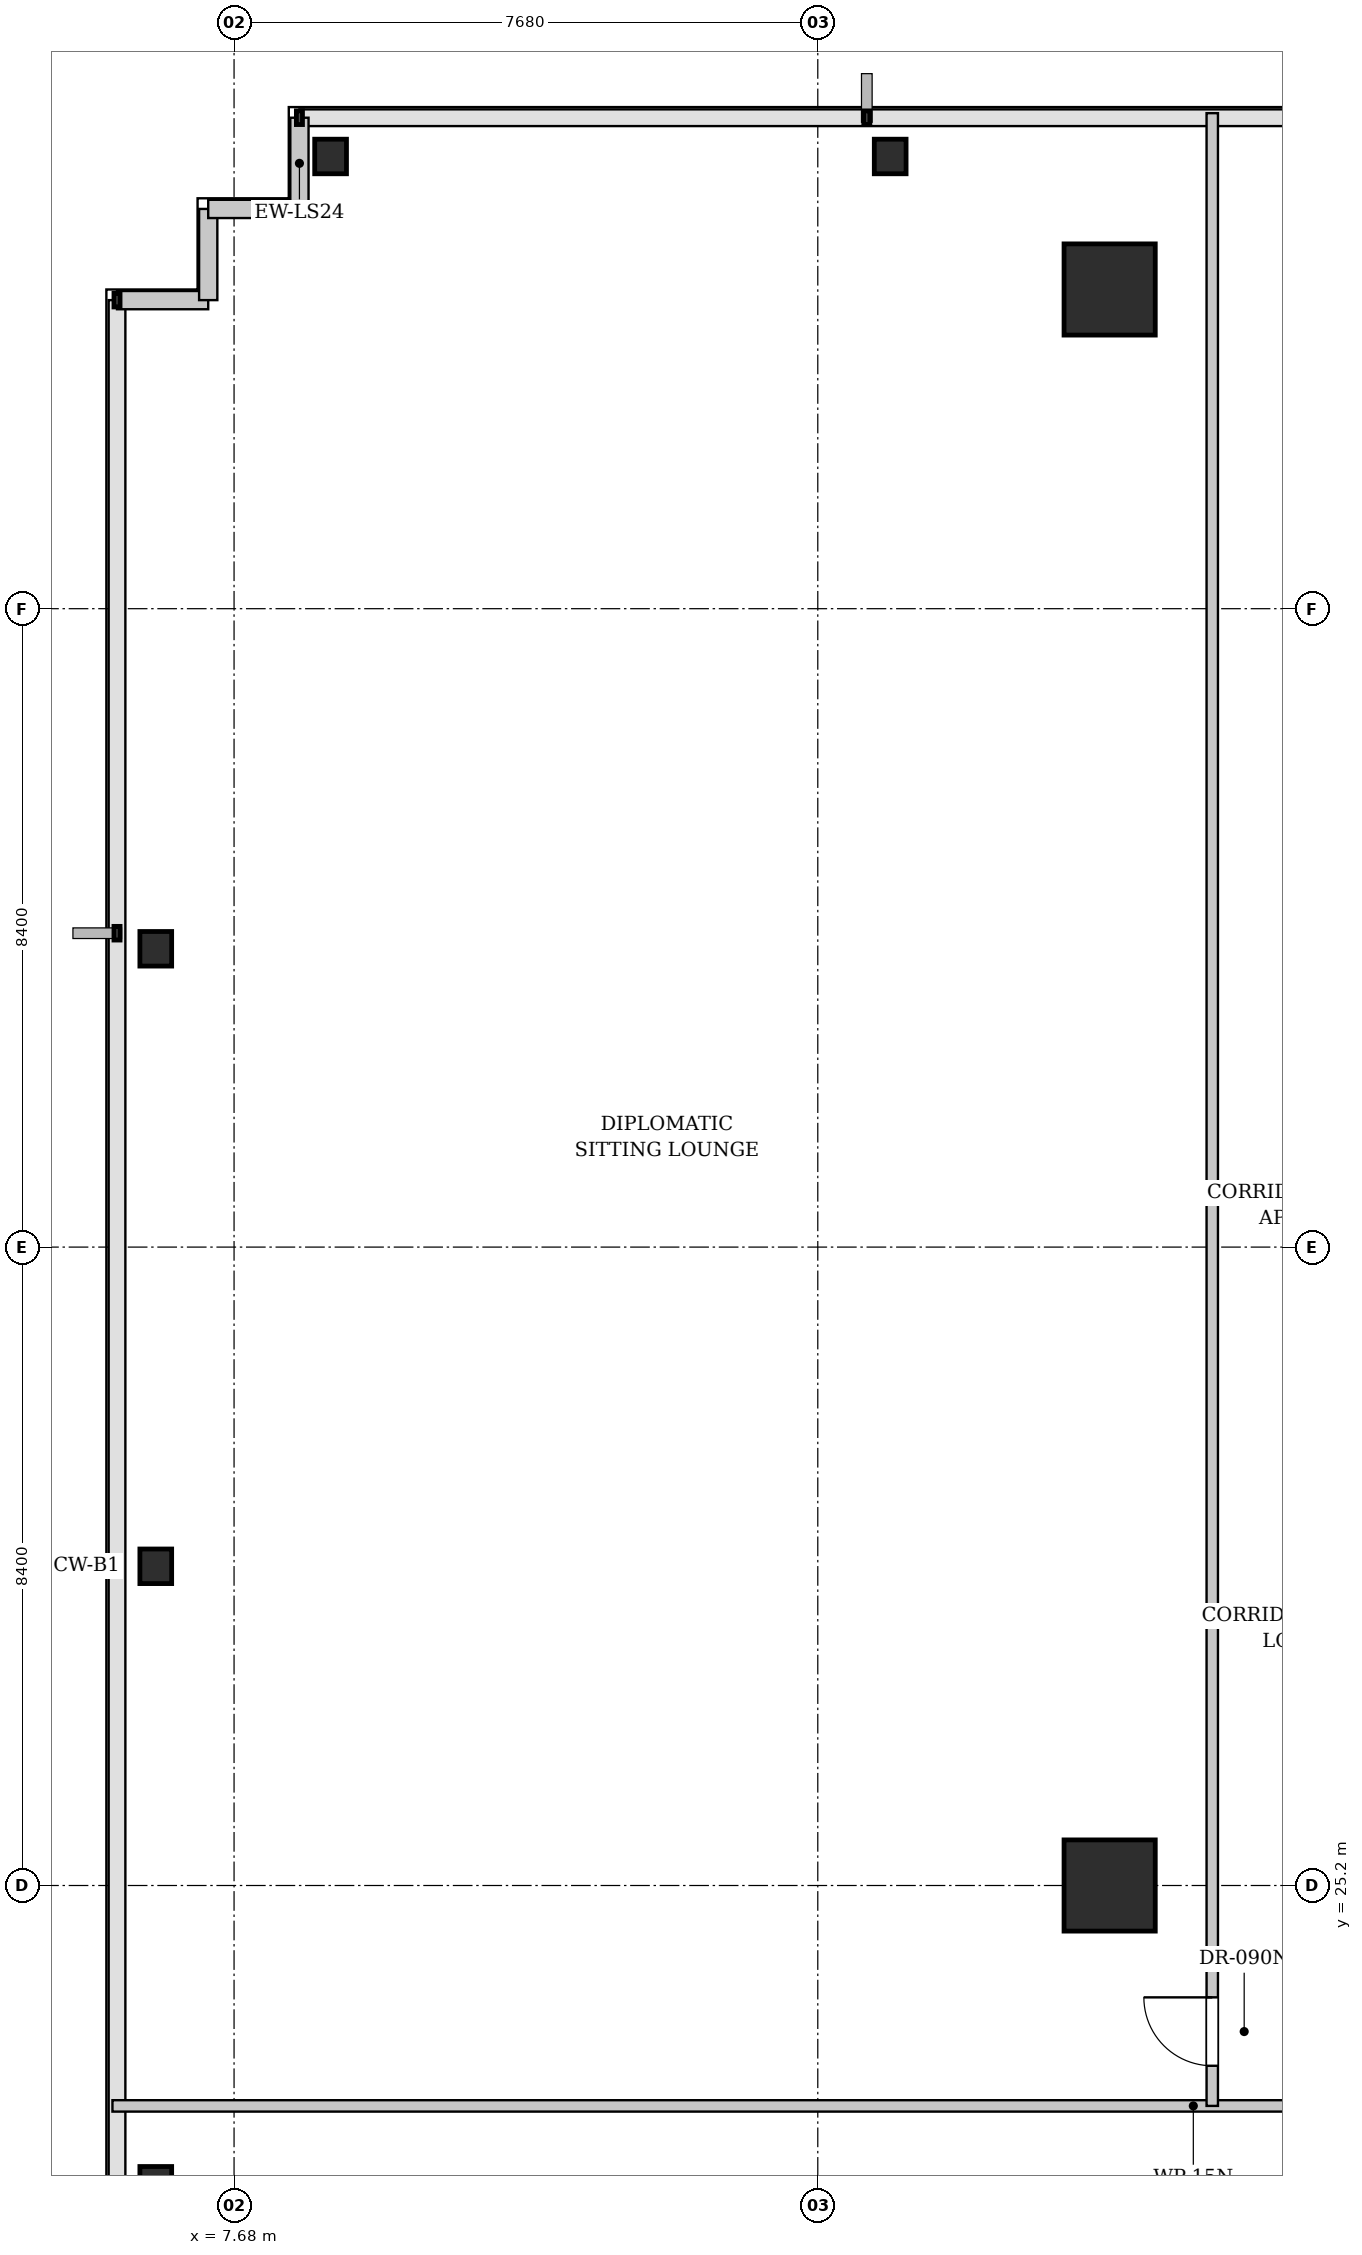
"""IFC4 building model, lengths in metres.
Left out: names, types, materials, properties, quantities, classifications, styles, units other than length and angle.
Written with IfcOpenShell. Run it as: python <this file> out.ifc"""

import sys

from ifc_helpers import new_model, si_unit, direction, frame, frame_2d, origin, origin_2d, place, context, subcontext, project, spatial, rectangle, i_section, extrude, element, fill, save


model = new_model("IFC4")
c1 = context("Model", 3, precision=1e-05, world=origin(), true_north=direction((0.0, 1.0)))
c2 = subcontext(c1, "Body", "Model", "MODEL_VIEW")
j1 = project(units=[si_unit("LENGTHUNIT", "METRE"), si_unit("PLANEANGLEUNIT", "RADIAN")], contexts=[c1])
p1 = place(None, origin())
s1 = spatial("IfcSite", under=j1, at=p1, CompositionType="ELEMENT")
p2 = place(p1, origin())
s2 = spatial("IfcBuilding", under=s1, at=p2, CompositionType="ELEMENT")
p3 = place(p2, frame((0.0, 0.0, 47.4)))
s3 = spatial("IfcBuildingStorey", under=s2, at=p3, CompositionType="ELEMENT", Elevation=47.4)
for number, where, z_axis, x_axis in (
    (1, (19.2, 25.2, 0.0), (0.0, 0.0, 1.0), (1.0, 0.0, 0.0)),
    (2, (19.2, 46.2, 0.0), (0.0, 0.0, 1.0), (1.0, 0.0, 0.0)),
):
    element("IfcColumn", number, at=place(p3, frame(where, z_axis=z_axis, x_axis=x_axis)), inside=s3, PredefinedType="COLUMN", context=c2, shape_type="SweptSolid", body=[
        extrude(rectangle(XDim=1.2, YDim=1.2, at=origin_2d()), origin(), (0.0, 0.0, 1.0), 3.4),
    ])
for number, where, z_axis, x_axis in (
    (3, (8.95, 47.95, 0.0), (0.0, 0.0, 1.0), (1.0, 0.0, 0.0)),
    (4, (16.312, 47.95, 0.0), (0.0, 0.0, 1.0), (1.0, 0.0, 0.0)),
    (5, (6.65, 21.275, 0.0), (0.0, 0.0, 1.0), (1.0, 0.0, 0.0)),
    (6, (6.65, 29.4, 0.0), (0.0, 0.0, 1.0), (1.0, 0.0, 0.0)),
    (7, (6.65, 37.525, 0.0), (0.0, 0.0, 1.0), (1.0, 0.0, 0.0)),
):
    element("IfcColumn", number, at=place(p3, frame(where, z_axis=z_axis, x_axis=x_axis)), inside=s3, PredefinedType="COLUMN", context=c2, shape_type="SweptSolid", body=[
        extrude(i_section(OverallWidth=0.418, OverallDepth=0.455, WebThickness=0.042, FlangeThickness=0.068, FilletRadius=0.015, at=origin_2d()), origin(), (0.0, 0.0, 1.0), 3.4),
    ])
p4 = place(p3, frame((6.14, 46.06, 0.0), z_axis=(0.0, 0.0, 1.0), x_axis=(1.0, 0.0, 0.0)))
e8 = element("IfcWall", 8, at=p4, inside=s3, PredefinedType="SOLIDWALL", context=c2, shape_type="SweptSolid", body=[
    extrude(rectangle(XDim=1.2, YDim=0.24, at=frame_2d((0.6, 0.0))), origin(), (0.0, 0.0, 1.0), 3.18),
])
for number, where, z_axis, x_axis in (
    (9, (7.34, 46.06, 0.0), (0.0, 0.0, 1.0), (0.0, 1.0, 0.0)),
    (10, (7.34, 47.26, 0.0), (0.0, 0.0, 1.0), (1.0, 0.0, 0.0)),
    (11, (8.54, 47.26, 0.0), (0.0, 0.0, 1.0), (0.0, 1.0, 0.0)),
):
    element("IfcWall", number, at=place(p3, frame(where, z_axis=z_axis, x_axis=x_axis)), inside=s3, PredefinedType="SOLIDWALL", context=c2, shape_type="SweptSolid", body=[
        extrude(rectangle(XDim=1.2, YDim=0.24, at=frame_2d((0.6, 0.0))), origin(), (0.0, 0.0, 1.0), 3.18),
    ])
p5 = place(p3, frame((6.08, 22.3, 0.0), z_axis=(0.0, 0.0, 1.0), x_axis=(1.0, 0.0, 0.0)))
e12 = element("IfcWall", 12, at=p5, inside=s3, PredefinedType="PARTITIONING", context=c2, shape_type="SweptSolid", body=[
    extrude(rectangle(XDim=64.64, YDim=0.15, at=frame_2d((32.32, 0.0))), origin(), (0.0, 0.0, 1.0), 3.18),
])
p6 = place(p5, frame((19.214, 0.0, 0.0)))
e13 = element("IfcOpeningElement", 13, at=p6, cuts=e12, PredefinedType="OPENING", context=c2, shape_type="SweptSolid", body=[
    extrude(rectangle(XDim=1.0, YDim=2.15, at=frame_2d((0.5, 1.075))), frame((0.0, 0.085, 0.0), z_axis=(0.0, -1.0, 0.0), x_axis=(1.0, 0.0, 0.0)), (0.0, 0.0, 1.0), 0.17),
])
p7 = place(p5, frame((28.139, 0.0, 0.0)))
e14 = element("IfcOpeningElement", 14, at=p7, cuts=e12, PredefinedType="OPENING", context=c2, shape_type="SweptSolid", body=[
    extrude(rectangle(XDim=1.0, YDim=2.15, at=frame_2d((0.5, 1.075))), frame((0.0, 0.085, 0.0), z_axis=(0.0, -1.0, 0.0), x_axis=(1.0, 0.0, 0.0)), (0.0, 0.0, 1.0), 0.17),
])
p8 = place(p5, frame((35.501, 0.0, 0.0)))
e15 = element("IfcOpeningElement", 15, at=p8, cuts=e12, PredefinedType="OPENING", context=c2, shape_type="SweptSolid", body=[
    extrude(rectangle(XDim=1.0, YDim=2.15, at=frame_2d((0.5, 1.075))), frame((0.0, 0.085, 0.0), z_axis=(0.0, -1.0, 0.0), x_axis=(1.0, 0.0, 0.0)), (0.0, 0.0, 1.0), 0.17),
])
p9 = place(p5, frame((44.451, 0.0, 0.0)))
e16 = element("IfcOpeningElement", 16, at=p9, cuts=e12, PredefinedType="OPENING", context=c2, shape_type="SweptSolid", body=[
    extrude(rectangle(XDim=1.0, YDim=2.15, at=frame_2d((0.5, 1.075))), frame((0.0, 0.085, 0.0), z_axis=(0.0, -1.0, 0.0), x_axis=(1.0, 0.0, 0.0)), (0.0, 0.0, 1.0), 0.17),
])
p10 = place(p3, frame((20.55, 22.3, 0.0), z_axis=(0.0, 0.0, 1.0), x_axis=(0.0, 1.0, 0.0)))
e17 = element("IfcWall", 17, at=p10, inside=s3, PredefinedType="PARTITIONING", context=c2, shape_type="SweptSolid", body=[
    extrude(rectangle(XDim=26.22, YDim=0.15, at=frame_2d((13.11, 0.0))), origin(), (0.0, 0.0, 1.0), 3.18),
])
p11 = place(p10, frame((0.528, 0.0, 0.0)))
e18 = element("IfcOpeningElement", 18, at=p11, cuts=e17, PredefinedType="OPENING", context=c2, shape_type="SweptSolid", body=[
    extrude(rectangle(XDim=0.9, YDim=2.15, at=frame_2d((0.45, 1.075))), frame((0.0, 0.085, 0.0), z_axis=(0.0, -1.0, 0.0), x_axis=(1.0, 0.0, 0.0)), (0.0, 0.0, 1.0), 0.17),
])
p12 = place(p11, origin())
e19 = element("IfcDoor", 19, at=p12, inside=s3, OperationType="SINGLE_SWING_RIGHT", PredefinedType="DOOR", context=c2, shape_type="SweptSolid", body=[
    extrude(rectangle(XDim=0.9, YDim=2.15, at=frame_2d((0.45, 1.075))), frame((0.0, 0.025, 0.0), z_axis=(0.0, -1.0, 0.0), x_axis=(1.0, 0.0, 0.0)), (0.0, 0.0, 1.0), 0.05),
])
fill(e18, e19)
save(model, sys.argv[1])
